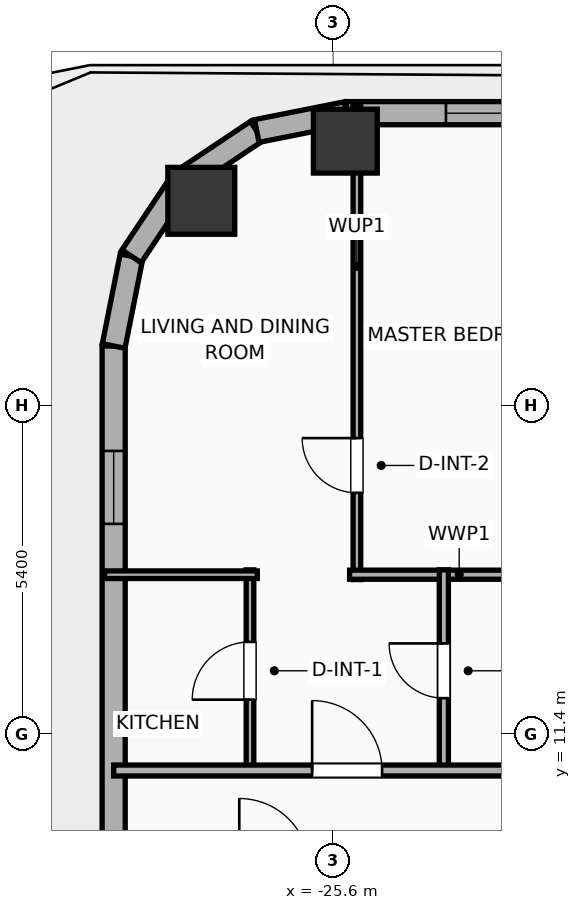
"""IFC4 building model, lengths in metres.
Left out: names, types, materials, properties, quantities, classifications, styles, units other than length and angle.
Written with IfcOpenShell. Run it as: python <this file> out.ifc"""

import sys

from ifc_helpers import new_model, si_unit, direction, frame, frame_2d, origin, origin_2d, place, context, subcontext, project, spatial, rectangle, hollow_rectangle, hollow_circle, extrude, element, fill, save


model = new_model("IFC4")
c1 = context("Model", 3, precision=1e-05, world=origin(), true_north=direction((0.0, 1.0)))
c2 = subcontext(c1, "Body", "Model", "MODEL_VIEW")
j1 = project(units=[si_unit("LENGTHUNIT", "METRE"), si_unit("PLANEANGLEUNIT", "RADIAN")], contexts=[c1])
p1 = place(None, origin())
s1 = spatial("IfcSite", under=j1, at=p1, CompositionType="ELEMENT")
p2 = place(p1, origin())
s2 = spatial("IfcBuilding", under=s1, at=p2, CompositionType="ELEMENT")
p3 = place(p2, frame((0.0, 0.0, 85.8)))
s3 = spatial("IfcBuildingStorey", under=s2, at=p3, CompositionType="ELEMENT", Elevation=85.8)
p4 = place(p3, frame((-25.4, 21.15, -0.4), z_axis=(0.0, 0.0, 1.0), x_axis=(1.0, 0.0, 0.0)))
e1 = element("IfcColumn", 1, at=p4, inside=s3, PredefinedType="COLUMN", context=c2, shape_type="SweptSolid", body=[
    extrude(hollow_rectangle(XDim=1.05, YDim=1.05, WallThickness=0.036, at=origin_2d()), origin(), (0.0, 0.0, 1.0), 4.3),
])
p5 = place(p3, frame((-27.769, 20.169, -0.4), z_axis=(0.0, 0.0, 1.0), x_axis=(1.0, 0.0, 0.0)))
e2 = element("IfcColumn", 2, at=p5, inside=s3, PredefinedType="COLUMN", context=c2, shape_type="SweptSolid", body=[
    extrude(hollow_circle(Radius=0.55, WallThickness=0.036, at=origin_2d()), origin(), (0.0, 0.0, 1.0), 4.3),
])
p6 = place(p3, frame((-29.21, -16.581, 0.0), z_axis=(0.0, 0.0, 1.0), x_axis=(0.0, 1.0, 0.0)))
e3 = element("IfcWall", 3, at=p6, inside=s3, PredefinedType="ELEMENTEDWALL", context=c2, shape_type="SweptSolid", body=[
    extrude(rectangle(XDim=34.363, YDim=0.38, at=frame_2d((17.181, 0.0))), origin(), (0.0, 0.0, 1.0), 2.54),
])
p7 = place(p6, frame((31.437, 0.0, 0.55)))
e4 = element("IfcOpeningElement", 4, at=p7, cuts=e3, PredefinedType="OPENING", context=c2, shape_type="SweptSolid", body=[
    extrude(rectangle(XDim=1.2, YDim=1.15, at=frame_2d((0.6, 0.575))), frame((0.0, 0.2, 0.0), z_axis=(0.0, -1.0, 0.0), x_axis=(1.0, 0.0, 0.0)), (0.0, 0.0, 1.0), 0.4),
])
p8 = place(p6, frame((21.976, 0.0, 0.55)))
e5 = element("IfcOpeningElement", 5, at=p8, cuts=e3, PredefinedType="OPENING", context=c2, shape_type="SweptSolid", body=[
    extrude(rectangle(XDim=1.2, YDim=1.15, at=frame_2d((0.6, 0.575))), frame((0.0, 0.2, 0.0), z_axis=(0.0, -1.0, 0.0), x_axis=(1.0, 0.0, 0.0)), (0.0, 0.0, 1.0), 0.4),
])
p9 = place(p6, frame((10.561, 0.0, 0.55)))
e6 = element("IfcOpeningElement", 6, at=p9, cuts=e3, PredefinedType="OPENING", context=c2, shape_type="SweptSolid", body=[
    extrude(rectangle(XDim=1.2, YDim=1.15, at=frame_2d((0.6, 0.575))), frame((0.0, 0.2, 0.0), z_axis=(0.0, -1.0, 0.0), x_axis=(1.0, 0.0, 0.0)), (0.0, 0.0, 1.0), 0.4),
])
p10 = place(p3, frame((-29.21, 17.781, 0.0), z_axis=(0.0, 0.0, 1.0), x_axis=(0.195086038585, 0.980786132421, 0.0)))
e7 = element("IfcWall", 7, at=p10, inside=s3, PredefinedType="ELEMENTEDWALL", context=c2, shape_type="SweptSolid", body=[
    extrude(rectangle(XDim=1.504, YDim=0.38, at=frame_2d((0.752, 0.0))), origin(), (0.0, 0.0, 1.0), 3.65),
])
p11 = place(p3, frame((-28.917, 19.257, 0.0), z_axis=(0.0, 0.0, 1.0), x_axis=(0.555610286119, 0.831442848281, 0.0)))
e8 = element("IfcWall", 8, at=p11, inside=s3, PredefinedType="ELEMENTEDWALL", context=c2, shape_type="SweptSolid", body=[
    extrude(rectangle(XDim=1.485, YDim=0.38, at=frame_2d((0.743, 0.0))), origin(), (0.0, 0.0, 1.0), 3.65),
])
p12 = place(p3, frame((-28.091, 20.491, 0.0), z_axis=(0.0, 0.0, 1.0), x_axis=(0.831468045563, 0.555572577804, 0.0)))
e9 = element("IfcWall", 9, at=p12, inside=s3, PredefinedType="ELEMENTEDWALL", context=c2, shape_type="SweptSolid", body=[
    extrude(rectangle(XDim=1.485, YDim=0.38, at=frame_2d((0.742, 0.0))), origin(), (0.0, 0.0, 1.0), 2.54),
])
p13 = place(p3, frame((-26.857, 21.316, 0.0), z_axis=(0.0, 0.0, 1.0), x_axis=(0.980755066645, 0.195242155415, 0.0)))
e10 = element("IfcWall", 10, at=p13, inside=s3, PredefinedType="ELEMENTEDWALL", context=c2, shape_type="SweptSolid", body=[
    extrude(rectangle(XDim=1.504, YDim=0.38, at=frame_2d((0.752, 0.0))), origin(), (0.0, 0.0, 1.0), 2.54),
])
p14 = place(p3, frame((-25.381, 21.61, 0.0), z_axis=(0.0, 0.0, 1.0), x_axis=(1.0, 0.0, 0.0)))
e11 = element("IfcWall", 11, at=p14, inside=s3, PredefinedType="ELEMENTEDWALL", context=c2, shape_type="SweptSolid", body=[
    extrude(rectangle(XDim=54.763, YDim=0.38, at=frame_2d((27.381, 0.0))), origin(), (0.0, 0.0, 1.0), 2.54),
])
p15 = place(p14, frame((5.645, 0.0, 0.75)))
e12 = element("IfcOpeningElement", 12, at=p15, cuts=e11, PredefinedType="OPENING", context=c2, shape_type="SweptSolid", body=[
    extrude(rectangle(XDim=2.4, YDim=1.45, at=frame_2d((1.2, 0.725))), frame((0.0, 0.2, 0.0), z_axis=(0.0, -1.0, 0.0), x_axis=(1.0, 0.0, 0.0)), (0.0, 0.0, 1.0), 0.4),
])
p16 = place(p14, frame((47.567, 0.0, 0.75)))
e13 = element("IfcOpeningElement", 13, at=p16, cuts=e11, PredefinedType="OPENING", context=c2, shape_type="SweptSolid", body=[
    extrude(rectangle(XDim=2.4, YDim=1.45, at=frame_2d((1.2, 0.725))), frame((0.0, 0.2, 0.0), z_axis=(0.0, -1.0, 0.0), x_axis=(1.0, 0.0, 0.0)), (0.0, 0.0, 1.0), 0.4),
])
p17 = place(p14, frame((1.635, 0.0, 0.55)))
e14 = element("IfcOpeningElement", 14, at=p17, cuts=e11, PredefinedType="OPENING", context=c2, shape_type="SweptSolid", body=[
    extrude(rectangle(XDim=1.2, YDim=1.15, at=frame_2d((0.6, 0.575))), frame((0.0, 0.2, 0.0), z_axis=(0.0, -1.0, 0.0), x_axis=(1.0, 0.0, 0.0)), (0.0, 0.0, 1.0), 0.4),
])
p18 = place(p14, frame((8.996, 0.0, 0.55)))
e15 = element("IfcOpeningElement", 15, at=p18, cuts=e11, PredefinedType="OPENING", context=c2, shape_type="SweptSolid", body=[
    extrude(rectangle(XDim=1.2, YDim=1.15, at=frame_2d((0.6, 0.575))), frame((0.0, 0.2, 0.0), z_axis=(0.0, -1.0, 0.0), x_axis=(1.0, 0.0, 0.0)), (0.0, 0.0, 1.0), 0.4),
])
p19 = place(p14, frame((13.576, 0.0, 0.55)))
e16 = element("IfcOpeningElement", 16, at=p19, cuts=e11, PredefinedType="OPENING", context=c2, shape_type="SweptSolid", body=[
    extrude(rectangle(XDim=1.2, YDim=1.15, at=frame_2d((0.6, 0.575))), frame((0.0, 0.2, 0.0), z_axis=(0.0, -1.0, 0.0), x_axis=(1.0, 0.0, 0.0)), (0.0, 0.0, 1.0), 0.4),
])
p20 = place(p14, frame((17.676, 0.0, 0.55)))
e17 = element("IfcOpeningElement", 17, at=p20, cuts=e11, PredefinedType="OPENING", context=c2, shape_type="SweptSolid", body=[
    extrude(rectangle(XDim=1.2, YDim=1.15, at=frame_2d((0.6, 0.575))), frame((0.0, 0.2, 0.0), z_axis=(0.0, -1.0, 0.0), x_axis=(1.0, 0.0, 0.0)), (0.0, 0.0, 1.0), 0.4),
])
p21 = place(p14, frame((20.319, 0.0, 0.55)))
e18 = element("IfcOpeningElement", 18, at=p21, cuts=e11, PredefinedType="OPENING", context=c2, shape_type="SweptSolid", body=[
    extrude(rectangle(XDim=0.85, YDim=1.15, at=frame_2d((0.425, 0.575))), frame((0.0, 0.2, 0.0), z_axis=(0.0, -1.0, 0.0), x_axis=(1.0, 0.0, 0.0)), (0.0, 0.0, 1.0), 0.4),
])
p22 = place(p14, frame((24.844, 0.0, 0.55)))
e19 = element("IfcOpeningElement", 19, at=p22, cuts=e11, PredefinedType="OPENING", context=c2, shape_type="SweptSolid", body=[
    extrude(rectangle(XDim=1.2, YDim=1.15, at=frame_2d((0.6, 0.575))), frame((0.0, 0.2, 0.0), z_axis=(0.0, -1.0, 0.0), x_axis=(1.0, 0.0, 0.0)), (0.0, 0.0, 1.0), 0.4),
])
p23 = place(p14, frame((29.976, 0.0, 0.55)))
e20 = element("IfcOpeningElement", 20, at=p23, cuts=e11, PredefinedType="OPENING", context=c2, shape_type="SweptSolid", body=[
    extrude(rectangle(XDim=1.2, YDim=1.15, at=frame_2d((0.6, 0.575))), frame((0.0, 0.2, 0.0), z_axis=(0.0, -1.0, 0.0), x_axis=(1.0, 0.0, 0.0)), (0.0, 0.0, 1.0), 0.4),
])
p24 = place(p14, frame((34.076, 0.0, 0.55)))
e21 = element("IfcOpeningElement", 21, at=p24, cuts=e11, PredefinedType="OPENING", context=c2, shape_type="SweptSolid", body=[
    extrude(rectangle(XDim=1.2, YDim=1.15, at=frame_2d((0.6, 0.575))), frame((0.0, 0.2, 0.0), z_axis=(0.0, -1.0, 0.0), x_axis=(1.0, 0.0, 0.0)), (0.0, 0.0, 1.0), 0.4),
])
p25 = place(p14, frame((38.176, 0.0, 0.55)))
e22 = element("IfcOpeningElement", 22, at=p25, cuts=e11, PredefinedType="OPENING", context=c2, shape_type="SweptSolid", body=[
    extrude(rectangle(XDim=1.2, YDim=1.15, at=frame_2d((0.6, 0.575))), frame((0.0, 0.2, 0.0), z_axis=(0.0, -1.0, 0.0), x_axis=(1.0, 0.0, 0.0)), (0.0, 0.0, 1.0), 0.4),
])
p26 = place(p14, frame((41.796, 0.0, 0.55)))
e23 = element("IfcOpeningElement", 23, at=p26, cuts=e11, PredefinedType="OPENING", context=c2, shape_type="SweptSolid", body=[
    extrude(rectangle(XDim=1.2, YDim=1.15, at=frame_2d((0.6, 0.575))), frame((0.0, 0.2, 0.0), z_axis=(0.0, -1.0, 0.0), x_axis=(1.0, 0.0, 0.0)), (0.0, 0.0, 1.0), 0.4),
])
p27 = place(p14, frame((45.336, 0.0, 0.55)))
e24 = element("IfcOpeningElement", 24, at=p27, cuts=e11, PredefinedType="OPENING", context=c2, shape_type="SweptSolid", body=[
    extrude(rectangle(XDim=1.2, YDim=1.15, at=frame_2d((0.6, 0.575))), frame((0.0, 0.2, 0.0), z_axis=(0.0, -1.0, 0.0), x_axis=(1.0, 0.0, 0.0)), (0.0, 0.0, 1.0), 0.4),
])
p28 = place(p14, frame((53.022, 0.0, 0.55)))
e25 = element("IfcOpeningElement", 25, at=p28, cuts=e11, PredefinedType="OPENING", context=c2, shape_type="SweptSolid", body=[
    extrude(rectangle(XDim=0.85, YDim=1.15, at=frame_2d((0.425, 0.575))), frame((0.0, 0.2, 0.0), z_axis=(0.0, -1.0, 0.0), x_axis=(1.0, 0.0, 0.0)), (0.0, 0.0, 1.0), 0.4),
])
p29 = place(p3, frame((-25.21, 13.94, 0.0), z_axis=(0.0, 0.0, 1.0), x_axis=(0.0, 1.0, 0.0)))
e26 = element("IfcWall", 26, at=p29, inside=s3, PredefinedType="PARTITIONING", context=c2, shape_type="SweptSolid", body=[
    extrude(rectangle(XDim=7.82, YDim=0.125, at=frame_2d((3.91, 0.0))), origin(), (0.0, 0.0, 1.0), 3.65),
])
p30 = place(p29, frame((1.427, 0.0, 0.0)))
e27 = element("IfcOpeningElement", 27, at=p30, cuts=e26, PredefinedType="OPENING", context=c2, shape_type="SweptSolid", body=[
    extrude(rectangle(XDim=0.9, YDim=2.05, at=frame_2d((0.45, 1.025))), frame((0.0, 0.073, 0.0), z_axis=(0.0, -1.0, 0.0), x_axis=(1.0, 0.0, 0.0)), (0.0, 0.0, 1.0), 0.145),
])
p31 = place(p3, frame((-25.33, 14.02, 0.0), z_axis=(0.0, 0.0, 1.0), x_axis=(1.0, 0.0, 0.0)))
e28 = element("IfcWall", 28, at=p31, inside=s3, PredefinedType="PLUMBINGWALL", context=c2, shape_type="SweptSolid", body=[
    extrude(rectangle(XDim=3.605, YDim=0.15, at=frame_2d((1.802, 0.0))), origin(), (0.0, 0.0, 1.0), 3.65),
])
p32 = place(p3, frame((-26.968, 10.78, 0.0), z_axis=(0.0, 0.0, 1.0), x_axis=(0.0, 1.0, 0.0)))
e29 = element("IfcWall", 29, at=p32, inside=s3, PredefinedType="PARTITIONING", context=c2, shape_type="SweptSolid", body=[
    extrude(rectangle(XDim=3.32, YDim=0.125, at=frame_2d((1.66, 0.0))), origin(), (0.0, 0.0, 1.0), 3.65),
])
p33 = place(p32, frame((1.185, 0.0, 0.0)))
e30 = element("IfcOpeningElement", 30, at=p33, cuts=e29, PredefinedType="OPENING", context=c2, shape_type="SweptSolid", body=[
    extrude(rectangle(XDim=0.95, YDim=2.05, at=frame_2d((0.475, 1.025))), frame((0.0, 0.073, 0.0), z_axis=(0.0, -1.0, 0.0), x_axis=(1.0, 0.0, 0.0)), (0.0, 0.0, 1.0), 0.145),
])
p34 = place(p3, frame((-29.36, 14.02, 0.0), z_axis=(0.0, 0.0, 1.0), x_axis=(1.0, 0.0, 0.0)))
e31 = element("IfcWall", 31, at=p34, inside=s3, PredefinedType="PARTITIONING", context=c2, shape_type="SweptSolid", body=[
    extrude(rectangle(XDim=2.512, YDim=0.125, at=frame_2d((1.256, 0.0))), origin(), (0.0, 0.0, 1.0), 3.65),
])
p35 = place(p3, frame((-23.78, 10.78, 0.0), z_axis=(0.0, 0.0, 1.0), x_axis=(0.0, 1.0, 0.0)))
e32 = element("IfcWall", 32, at=p35, inside=s3, PredefinedType="PLUMBINGWALL", context=c2, shape_type="SweptSolid", body=[
    extrude(rectangle(XDim=3.32, YDim=0.15, at=frame_2d((1.66, 0.0))), origin(), (0.0, 0.0, 1.0), 3.65),
])
p36 = place(p35, frame((1.21, 0.0, 0.0)))
e33 = element("IfcOpeningElement", 33, at=p36, cuts=e32, PredefinedType="OPENING", context=c2, shape_type="SweptSolid", body=[
    extrude(rectangle(XDim=0.9, YDim=2.05, at=frame_2d((0.45, 1.025))), frame((0.0, 0.085, 0.0), z_axis=(0.0, -1.0, 0.0), x_axis=(1.0, 0.0, 0.0)), (0.0, 0.0, 1.0), 0.17),
])
p37 = place(p3, frame((-29.21, 10.8, 0.0), z_axis=(0.0, 0.0, 1.0), x_axis=(1.0, 0.0, 0.0)))
e34 = element("IfcWall", 34, at=p37, inside=s3, PredefinedType="PARTITIONING", context=c2, shape_type="SweptSolid", body=[
    extrude(rectangle(XDim=62.42, YDim=0.18, at=frame_2d((31.21, 0.0))), origin(), (0.0, 0.0, 1.0), 3.65),
])
p38 = place(p37, frame((3.264, 0.0, 0.0)))
e35 = element("IfcOpeningElement", 35, at=p38, cuts=e34, PredefinedType="OPENING", context=c2, shape_type="SweptSolid", body=[
    extrude(rectangle(XDim=1.15, YDim=2.05, at=frame_2d((0.575, 1.025))), frame((0.0, 0.1, 0.0), z_axis=(0.0, -1.0, 0.0), x_axis=(1.0, 0.0, 0.0)), (0.0, 0.0, 1.0), 0.2),
])
p39 = place(p37, frame((11.116, 0.0, 0.0)))
e36 = element("IfcOpeningElement", 36, at=p39, cuts=e34, PredefinedType="OPENING", context=c2, shape_type="SweptSolid", body=[
    extrude(rectangle(XDim=1.15, YDim=2.05, at=frame_2d((0.575, 1.025))), frame((0.0, 0.1, 0.0), z_axis=(0.0, -1.0, 0.0), x_axis=(1.0, 0.0, 0.0)), (0.0, 0.0, 1.0), 0.2),
])
p40 = place(p37, frame((19.3, 0.0, 0.0)))
e37 = element("IfcOpeningElement", 37, at=p40, cuts=e34, PredefinedType="OPENING", context=c2, shape_type="SweptSolid", body=[
    extrude(rectangle(XDim=1.15, YDim=2.05, at=frame_2d((0.575, 1.025))), frame((0.0, 0.1, 0.0), z_axis=(0.0, -1.0, 0.0), x_axis=(1.0, 0.0, 0.0)), (0.0, 0.0, 1.0), 0.2),
])
p41 = place(p37, frame((27.452, 0.0, 0.0)))
e38 = element("IfcOpeningElement", 38, at=p41, cuts=e34, PredefinedType="OPENING", context=c2, shape_type="SweptSolid", body=[
    extrude(rectangle(XDim=1.15, YDim=2.05, at=frame_2d((0.575, 1.025))), frame((0.0, 0.1, 0.0), z_axis=(0.0, -1.0, 0.0), x_axis=(1.0, 0.0, 0.0)), (0.0, 0.0, 1.0), 0.2),
])
p42 = place(p37, frame((35.697, 0.0, 0.0)))
e39 = element("IfcOpeningElement", 39, at=p42, cuts=e34, PredefinedType="OPENING", context=c2, shape_type="SweptSolid", body=[
    extrude(rectangle(XDim=1.15, YDim=2.05, at=frame_2d((0.575, 1.025))), frame((0.0, 0.1, 0.0), z_axis=(0.0, -1.0, 0.0), x_axis=(1.0, 0.0, 0.0)), (0.0, 0.0, 1.0), 0.2),
])
p43 = place(p37, frame((43.899, 0.0, 0.0)))
e40 = element("IfcOpeningElement", 40, at=p43, cuts=e34, PredefinedType="OPENING", context=c2, shape_type="SweptSolid", body=[
    extrude(rectangle(XDim=1.15, YDim=2.05, at=frame_2d((0.575, 1.025))), frame((0.0, 0.1, 0.0), z_axis=(0.0, -1.0, 0.0), x_axis=(1.0, 0.0, 0.0)), (0.0, 0.0, 1.0), 0.2),
])
p44 = place(p37, frame((51.599, 0.0, 0.0)))
e41 = element("IfcOpeningElement", 41, at=p44, cuts=e34, PredefinedType="OPENING", context=c2, shape_type="SweptSolid", body=[
    extrude(rectangle(XDim=1.15, YDim=2.05, at=frame_2d((0.575, 1.025))), frame((0.0, 0.1, 0.0), z_axis=(0.0, -1.0, 0.0), x_axis=(1.0, 0.0, 0.0)), (0.0, 0.0, 1.0), 0.2),
])
p45 = place(p37, frame((59.242, 0.0, 0.0)))
e42 = element("IfcOpeningElement", 42, at=p45, cuts=e34, PredefinedType="OPENING", context=c2, shape_type="SweptSolid", body=[
    extrude(rectangle(XDim=0.9, YDim=2.05, at=frame_2d((0.45, 1.025))), frame((0.0, 0.1, 0.0), z_axis=(0.0, -1.0, 0.0), x_axis=(1.0, 0.0, 0.0)), (0.0, 0.0, 1.0), 0.2),
])
p46 = place(p7, origin())
e43 = element("IfcWindow", 43, at=p46, inside=s3, PartitioningType="SINGLE_PANEL", PredefinedType="WINDOW", context=c2, shape_type="SweptSolid", body=[
    extrude(rectangle(XDim=1.2, YDim=1.15, at=frame_2d((0.6, 0.575))), frame((0.0, 0.03, 0.0), z_axis=(0.0, -1.0, 0.0), x_axis=(1.0, 0.0, 0.0)), (0.0, 0.0, 1.0), 0.06),
])
fill(e4, e43)
p47 = place(p17, origin())
e44 = element("IfcWindow", 44, at=p47, inside=s3, PartitioningType="SINGLE_PANEL", PredefinedType="WINDOW", context=c2, shape_type="SweptSolid", body=[
    extrude(rectangle(XDim=1.2, YDim=1.15, at=frame_2d((0.6, 0.575))), frame((0.0, 0.03, 0.0), z_axis=(0.0, -1.0, 0.0), x_axis=(1.0, 0.0, 0.0)), (0.0, 0.0, 1.0), 0.06),
])
fill(e14, e44)
p48 = place(p30, origin())
e45 = element("IfcDoor", 45, at=p48, inside=s3, OperationType="SINGLE_SWING_RIGHT", PredefinedType="DOOR", context=c2, shape_type="SweptSolid", body=[
    extrude(rectangle(XDim=0.9, YDim=2.05, at=frame_2d((0.45, 1.025))), frame((0.0, 0.025, 0.0), z_axis=(0.0, -1.0, 0.0), x_axis=(1.0, 0.0, 0.0)), (0.0, 0.0, 1.0), 0.05),
])
fill(e27, e45)
p49 = place(p33, origin())
e46 = element("IfcDoor", 46, at=p49, inside=s3, OperationType="SINGLE_SWING_LEFT", PredefinedType="DOOR", context=c2, shape_type="SweptSolid", body=[
    extrude(rectangle(XDim=0.95, YDim=2.05, at=frame_2d((0.475, 1.025))), frame((0.0, 0.025, 0.0), z_axis=(0.0, -1.0, 0.0), x_axis=(1.0, 0.0, 0.0)), (0.0, 0.0, 1.0), 0.05),
])
fill(e30, e46)
p50 = place(p36, origin())
e47 = element("IfcDoor", 47, at=p50, inside=s3, OperationType="SINGLE_SWING_RIGHT", PredefinedType="DOOR", context=c2, shape_type="SweptSolid", body=[
    extrude(rectangle(XDim=0.9, YDim=2.05, at=frame_2d((0.45, 1.025))), frame((0.0, 0.025, 0.0), z_axis=(0.0, -1.0, 0.0), x_axis=(1.0, 0.0, 0.0)), (0.0, 0.0, 1.0), 0.05),
])
fill(e33, e47)
p51 = place(p38, origin())
e48 = element("IfcDoor", 48, at=p51, inside=s3, OperationType="SINGLE_SWING_LEFT", PredefinedType="DOOR", context=c2, shape_type="SweptSolid", body=[
    extrude(rectangle(XDim=1.15, YDim=2.05, at=frame_2d((0.575, 1.025))), frame((0.0, 0.025, 0.0), z_axis=(0.0, -1.0, 0.0), x_axis=(1.0, 0.0, 0.0)), (0.0, 0.0, 1.0), 0.05),
])
fill(e35, e48)
save(model, sys.argv[1])
